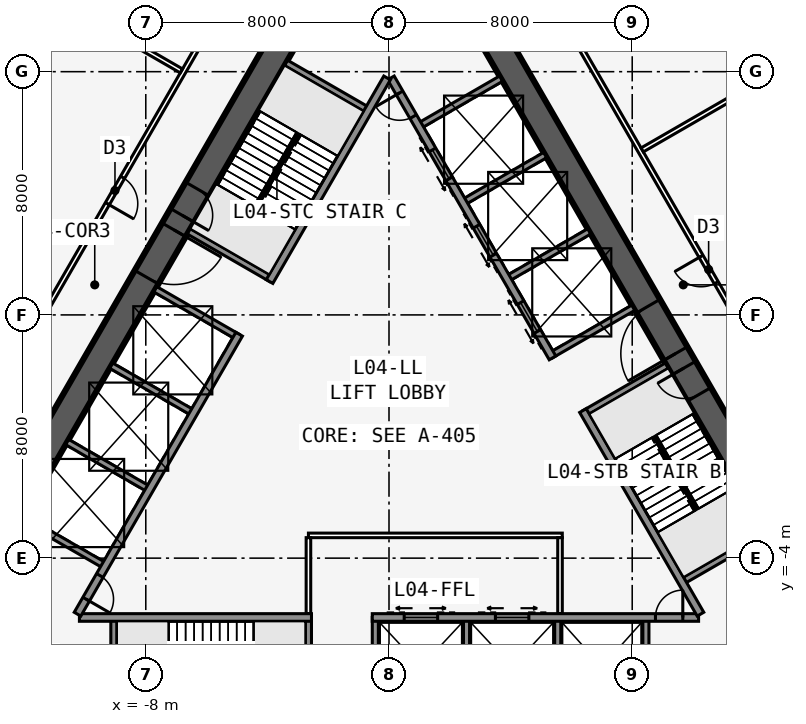
"""IFC4 building model, lengths in metres.
Left out: names, types, materials, properties, quantities, classifications, styles, units other than length and angle.
Written with IfcOpenShell. Run it as: python <this file> out.ifc"""

import sys

from ifc_helpers import new_model, si_unit, direction, frame, frame_2d, origin, place, context, subcontext, project, spatial, rectangle, extrude, element, fill, save


model = new_model("IFC4")
c1 = context("Model", 3, precision=1e-05, world=origin(), true_north=direction((0.0, 1.0)))
c2 = subcontext(c1, "Body", "Model", "MODEL_VIEW")
j1 = project(units=[si_unit("LENGTHUNIT", "METRE"), si_unit("PLANEANGLEUNIT", "RADIAN")], contexts=[c1])
p1 = place(None, origin())
s1 = spatial("IfcSite", under=j1, at=p1, CompositionType="ELEMENT")
p2 = place(p1, origin())
s2 = spatial("IfcBuilding", under=s1, at=p2, CompositionType="ELEMENT")
p3 = place(p2, frame((0.0, 0.0, 22.5)))
s3 = spatial("IfcBuildingStorey", under=s2, at=p3, CompositionType="ELEMENT", Elevation=22.5)
p4 = place(p3, frame((-10.183, -5.951, 0.0), z_axis=(0.0, 0.0, 1.0), x_axis=(1.0, 0.0, 0.0)))
e1 = element("IfcWall", 1, at=p4, inside=s3, PredefinedType="SOLIDWALL", context=c2, shape_type="SweptSolid", body=[
    extrude(rectangle(XDim=7.633, YDim=0.25, at=frame_2d((3.816, 0.0))), origin(), (0.0, 0.0, 1.0), 5.835),
])
p5 = place(p3, frame((-0.55, -5.951, 0.0), z_axis=(0.0, 0.0, 1.0), x_axis=(1.0, 0.0, 0.0)))
e2 = element("IfcWall", 2, at=p5, inside=s3, PredefinedType="SOLIDWALL", context=c2, shape_type="SweptSolid", body=[
    extrude(rectangle(XDim=10.733, YDim=0.25, at=frame_2d((5.366, 0.0))), origin(), (0.0, 0.0, 1.0), 5.835),
])
p6 = place(p5, frame((9.314, 0.0, 0.0)))
e3 = element("IfcOpeningElement", 3, at=p6, cuts=e2, PredefinedType="OPENING", context=c2, shape_type="SweptSolid", body=[
    extrude(rectangle(XDim=0.9, YDim=2.13, at=frame_2d((0.45, 1.065))), frame((0.0, 0.135, 0.0), z_axis=(0.0, -1.0, 0.0), x_axis=(1.0, 0.0, 0.0)), (0.0, 0.0, 1.0), 0.27),
])
p7 = place(p5, frame((1.05, 0.0, 0.0)))
e4 = element("IfcOpeningElement", 4, at=p7, cuts=e2, PredefinedType="OPENING", context=c2, shape_type="SweptSolid", body=[
    extrude(rectangle(XDim=1.1, YDim=2.13, at=frame_2d((0.55, 1.065))), frame((0.0, 0.135, 0.0), z_axis=(0.0, -1.0, 0.0), x_axis=(1.0, 0.0, 0.0)), (0.0, 0.0, 1.0), 0.27),
])
p8 = place(p5, frame((4.05, 0.0, 0.0)))
e5 = element("IfcOpeningElement", 5, at=p8, cuts=e2, PredefinedType="OPENING", context=c2, shape_type="SweptSolid", body=[
    extrude(rectangle(XDim=1.1, YDim=2.13, at=frame_2d((0.55, 1.065))), frame((0.0, 0.135, 0.0), z_axis=(0.0, -1.0, 0.0), x_axis=(1.0, 0.0, 0.0)), (0.0, 0.0, 1.0), 0.27),
])
p9 = place(p3, frame((-9.05, -5.951, 0.0), z_axis=(0.0, 0.0, 1.0), x_axis=(0.0, -1.0, 0.0)))
e6 = element("IfcWall", 6, at=p9, inside=s3, PredefinedType="SOLIDWALL", context=c2, shape_type="SweptSolid", body=[
    extrude(rectangle(XDim=3.125, YDim=0.2, at=frame_2d((1.562, 0.0))), origin(), (0.0, 0.0, 1.0), 5.835),
])
p10 = place(p3, frame((-2.65, -5.951, 0.0), z_axis=(0.0, 0.0, 1.0), x_axis=(0.0, -1.0, 0.0)))
e7 = element("IfcWall", 7, at=p10, inside=s3, PredefinedType="SOLIDWALL", context=c2, shape_type="SweptSolid", body=[
    extrude(rectangle(XDim=3.125, YDim=0.2, at=frame_2d((1.562, 0.0))), origin(), (0.0, 0.0, 1.0), 5.835),
])
p11 = place(p10, frame((1.525, 0.0, 0.0)))
e8 = element("IfcOpeningElement", 8, at=p11, cuts=e7, PredefinedType="OPENING", context=c2, shape_type="SweptSolid", body=[
    extrude(rectangle(XDim=1.0, YDim=2.13, at=frame_2d((0.5, 1.065))), frame((0.0, 0.11, 0.0), z_axis=(0.0, -1.0, 0.0), x_axis=(1.0, 0.0, 0.0)), (0.0, 0.0, 1.0), 0.22),
])
for number, where, z_axis, x_axis in (
    (9, (-0.45, -5.951, 0.0), (0.0, 0.0, 1.0), (0.0, -1.0, 0.0)),
    (10, (2.55, -5.951, 0.0), (0.0, 0.0, 1.0), (0.0, -1.0, 0.0)),
    (11, (5.55, -5.951, 0.0), (0.0, 0.0, 1.0), (0.0, -1.0, 0.0)),
    (12, (8.45, -5.951, 0.0), (0.0, 0.0, 1.0), (0.0, -1.0, 0.0)),
):
    element("IfcWall", number, at=place(p3, frame(where, z_axis=z_axis, x_axis=x_axis)), inside=s3, PredefinedType="SOLIDWALL", context=c2, shape_type="SweptSolid", body=[
        extrude(rectangle(XDim=3.125, YDim=0.2, at=frame_2d((1.562, 0.0))), origin(), (0.0, 0.0, 1.0), 5.835),
    ])
p12 = place(p3, frame((16.5, -9.526, 0.0), z_axis=(0.0, 0.0, 1.0), x_axis=(-0.499999749417, 0.866025548458, 0.0)))
e13 = element("IfcWall", 13, at=p12, inside=s3, PredefinedType="SHEAR", context=c2, shape_type="SweptSolid", body=[
    extrude(rectangle(XDim=33.0, YDim=0.9, at=frame_2d((16.5, 0.0))), origin(), (0.0, 0.0, 1.0), 6.0),
])
p13 = place(p12, frame((14.15, 0.0, 0.0)))
e14 = element("IfcOpeningElement", 14, at=p13, cuts=e13, PredefinedType="OPENING", context=c2, shape_type="SweptSolid", body=[
    extrude(rectangle(XDim=1.8, YDim=2.13, at=frame_2d((0.9, 1.065))), frame((0.0, 0.46, 0.0), z_axis=(0.0, -1.0, 0.0), x_axis=(1.0, 0.0, 0.0)), (0.0, 0.0, 1.0), 0.92),
])
p14 = place(p12, frame((12.6, 0.0, 0.0)))
e15 = element("IfcOpeningElement", 15, at=p14, cuts=e13, PredefinedType="OPENING", context=c2, shape_type="SweptSolid", body=[
    extrude(rectangle(XDim=1.0, YDim=2.13, at=frame_2d((0.5, 1.065))), frame((0.0, 0.46, 0.0), z_axis=(0.0, -1.0, 0.0), x_axis=(1.0, 0.0, 0.0)), (0.0, 0.0, 1.0), 0.92),
])
p15 = place(p3, frame((10.245, -5.843, 0.0), z_axis=(0.0, 0.0, 1.0), x_axis=(-0.499993009313, 0.866029439822, 0.0)))
e16 = element("IfcWall", 16, at=p15, inside=s3, PredefinedType="SOLIDWALL", context=c2, shape_type="SweptSolid", body=[
    extrude(rectangle(XDim=7.733, YDim=0.25, at=frame_2d((3.866, 0.0))), origin(), (0.0, 0.0, 1.0), 5.835),
])
p16 = place(p3, frame((5.379, 2.586, 0.0), z_axis=(0.0, 0.0, 1.0), x_axis=(-0.500001375892, 0.866024609411, 0.0)))
e17 = element("IfcWall", 17, at=p16, inside=s3, PredefinedType="SOLIDWALL", context=c2, shape_type="SweptSolid", body=[
    extrude(rectangle(XDim=10.633, YDim=0.25, at=frame_2d((5.316, 0.0))), origin(), (0.0, 0.0, 1.0), 5.835),
])
p17 = place(p16, frame((9.164, 0.0, 0.0)))
e18 = element("IfcOpeningElement", 18, at=p17, cuts=e17, PredefinedType="OPENING", context=c2, shape_type="SweptSolid", body=[
    extrude(rectangle(XDim=0.9, YDim=2.13, at=frame_2d((0.45, 1.065))), frame((0.0, 0.135, 0.0), z_axis=(0.0, -1.0, 0.0), x_axis=(1.0, 0.0, 0.0)), (0.0, 0.0, 1.0), 0.27),
])
p18 = place(p16, frame((1.0, 0.0, 0.0)))
e19 = element("IfcOpeningElement", 19, at=p18, cuts=e17, PredefinedType="OPENING", context=c2, shape_type="SweptSolid", body=[
    extrude(rectangle(XDim=1.1, YDim=2.13, at=frame_2d((0.55, 1.065))), frame((0.0, 0.135, 0.0), z_axis=(0.0, -1.0, 0.0), x_axis=(1.0, 0.0, 0.0)), (0.0, 0.0, 1.0), 0.27),
])
p19 = place(p16, frame((3.9, 0.0, 0.0)))
e20 = element("IfcOpeningElement", 20, at=p19, cuts=e17, PredefinedType="OPENING", context=c2, shape_type="SweptSolid", body=[
    extrude(rectangle(XDim=1.1, YDim=2.13, at=frame_2d((0.55, 1.065))), frame((0.0, 0.135, 0.0), z_axis=(0.0, -1.0, 0.0), x_axis=(1.0, 0.0, 0.0)), (0.0, 0.0, 1.0), 0.27),
])
p20 = place(p16, frame((6.8, 0.0, 0.0)))
e21 = element("IfcOpeningElement", 21, at=p20, cuts=e17, PredefinedType="OPENING", context=c2, shape_type="SweptSolid", body=[
    extrude(rectangle(XDim=1.1, YDim=2.13, at=frame_2d((0.55, 1.065))), frame((0.0, 0.135, 0.0), z_axis=(0.0, -1.0, 0.0), x_axis=(1.0, 0.0, 0.0)), (0.0, 0.0, 1.0), 0.27),
])
for number, where, z_axis, x_axis in (
    (22, (9.629, -4.775, 0.0), (0.0, 0.0, 1.0), (0.866, 0.5, 0.0)),
    (23, (6.429, 0.767, 0.0), (0.0, 0.0, 1.0), (0.866, 0.5, 0.0)),
    (24, (5.329, 2.673, 0.0), (0.0, 0.0, 1.0), (0.866, 0.5, 0.0)),
    (25, (3.879, 5.184, 0.0), (0.0, 0.0, 1.0), (0.866, 0.5, 0.0)),
    (26, (2.429, 7.696, 0.0), (0.0, 0.0, 1.0), (0.866, 0.5, 0.0)),
    (27, (0.979, 10.207, 0.0), (0.0, 0.0, 1.0), (0.866, 0.5, 0.0)),
):
    element("IfcWall", number, at=place(p3, frame(where, z_axis=z_axis, x_axis=x_axis)), inside=s3, PredefinedType="SOLIDWALL", context=c2, shape_type="SweptSolid", body=[
        extrude(rectangle(XDim=3.125, YDim=0.2, at=frame_2d((1.562, 0.0))), origin(), (0.0, 0.0, 1.0), 5.835),
    ])
p21 = place(p3, frame((0.0, 19.052, 0.0), z_axis=(0.0, 0.0, 1.0), x_axis=(-0.499999749417, -0.866025548458, 0.0)))
e28 = element("IfcWall", 28, at=p21, inside=s3, PredefinedType="SHEAR", context=c2, shape_type="SweptSolid", body=[
    extrude(rectangle(XDim=33.0, YDim=0.9, at=frame_2d((16.5, 0.0))), origin(), (0.0, 0.0, 1.0), 6.0),
])
p22 = place(p21, frame((14.15, 0.0, 0.0)))
e29 = element("IfcOpeningElement", 29, at=p22, cuts=e28, PredefinedType="OPENING", context=c2, shape_type="SweptSolid", body=[
    extrude(rectangle(XDim=1.8, YDim=2.13, at=frame_2d((0.9, 1.065))), frame((0.0, 0.46, 0.0), z_axis=(0.0, -1.0, 0.0), x_axis=(1.0, 0.0, 0.0)), (0.0, 0.0, 1.0), 0.92),
])
p23 = place(p21, frame((12.6, 0.0, 0.0)))
e30 = element("IfcOpeningElement", 30, at=p23, cuts=e28, PredefinedType="OPENING", context=c2, shape_type="SweptSolid", body=[
    extrude(rectangle(XDim=1.0, YDim=2.13, at=frame_2d((0.5, 1.065))), frame((0.0, 0.46, 0.0), z_axis=(0.0, -1.0, 0.0), x_axis=(1.0, 0.0, 0.0)), (0.0, 0.0, 1.0), 0.92),
])
p24 = place(p3, frame((-0.062, 11.794, 0.0), z_axis=(0.0, 0.0, 1.0), x_axis=(-0.500006680225, -0.86602154692, 0.0)))
e31 = element("IfcWall", 31, at=p24, inside=s3, PredefinedType="SOLIDWALL", context=c2, shape_type="SweptSolid", body=[
    extrude(rectangle(XDim=7.733, YDim=0.25, at=frame_2d((3.866, 0.0))), origin(), (0.0, 0.0, 1.0), 5.835),
])
p25 = place(p3, frame((-4.929, 3.365, 0.0), z_axis=(0.0, 0.0, 1.0), x_axis=(-0.499991433582, -0.866030349552, 0.0)))
e32 = element("IfcWall", 32, at=p25, inside=s3, PredefinedType="SOLIDWALL", context=c2, shape_type="SweptSolid", body=[
    extrude(rectangle(XDim=10.633, YDim=0.25, at=frame_2d((5.316, 0.0))), origin(), (0.0, 0.0, 1.0), 5.835),
])
p26 = place(p25, frame((9.164, 0.0, 0.0)))
e33 = element("IfcOpeningElement", 33, at=p26, cuts=e32, PredefinedType="OPENING", context=c2, shape_type="SweptSolid", body=[
    extrude(rectangle(XDim=0.9, YDim=2.13, at=frame_2d((0.45, 1.065))), frame((0.0, 0.135, 0.0), z_axis=(0.0, -1.0, 0.0), x_axis=(1.0, 0.0, 0.0)), (0.0, 0.0, 1.0), 0.27),
])
for number, where, z_axis, x_axis in (
    (34, (-0.679, 10.727, 0.0), (0.0, 0.0, 1.0), (-0.866, 0.5, 0.0)),
    (35, (-3.879, 5.184, 0.0), (0.0, 0.0, 1.0), (-0.866, 0.5, 0.0)),
    (36, (-4.979, 3.279, 0.0), (0.0, 0.0, 1.0), (-0.866, 0.5, 0.0)),
    (37, (-6.429, 0.767, 0.0), (0.0, 0.0, 1.0), (-0.866, 0.5, 0.0)),
    (38, (-7.879, -1.744, 0.0), (0.0, 0.0, 1.0), (-0.866, 0.5, 0.0)),
    (39, (-9.329, -4.256, 0.0), (0.0, 0.0, 1.0), (-0.866, 0.5, 0.0)),
):
    element("IfcWall", number, at=place(p3, frame(where, z_axis=z_axis, x_axis=x_axis)), inside=s3, PredefinedType="SOLIDWALL", context=c2, shape_type="SweptSolid", body=[
        extrude(rectangle(XDim=3.125, YDim=0.2, at=frame_2d((1.562, 0.0))), origin(), (0.0, 0.0, 1.0), 5.835),
    ])
p27 = place(p3, frame((20.027, -10.985, 0.0), z_axis=(0.0, 0.0, 1.0), x_axis=(-0.500001677587, 0.866024435227, 0.0)))
e40 = element("IfcWall", 40, at=p27, inside=s3, PredefinedType="PARTITIONING", context=c2, shape_type="SweptSolid", body=[
    extrude(rectangle(XDim=39.054, YDim=0.15, at=frame_2d((19.527, 0.0))), origin(), (0.0, 0.0, 1.0), 5.835),
])
p28 = place(p27, frame((6.914, 0.0, 0.0)))
e41 = element("IfcOpeningElement", 41, at=p28, cuts=e40, PredefinedType="OPENING", context=c2, shape_type="SweptSolid", body=[
    extrude(rectangle(XDim=1.0, YDim=2.13, at=frame_2d((0.5, 1.065))), frame((0.0, 0.085, 0.0), z_axis=(0.0, -1.0, 0.0), x_axis=(1.0, 0.0, 0.0)), (0.0, 0.0, 1.0), 0.17),
])
p29 = place(p27, frame((18.527, 0.0, 0.0)))
e42 = element("IfcOpeningElement", 42, at=p29, cuts=e40, PredefinedType="OPENING", context=c2, shape_type="SweptSolid", body=[
    extrude(rectangle(XDim=1.0, YDim=2.13, at=frame_2d((0.5, 1.065))), frame((0.0, 0.085, 0.0), z_axis=(0.0, -1.0, 0.0), x_axis=(1.0, 0.0, 0.0)), (0.0, 0.0, 1.0), 0.17),
])
p30 = place(p27, frame((30.64, 0.0, 0.0)))
e43 = element("IfcOpeningElement", 43, at=p30, cuts=e40, PredefinedType="OPENING", context=c2, shape_type="SweptSolid", body=[
    extrude(rectangle(XDim=1.0, YDim=2.13, at=frame_2d((0.5, 1.065))), frame((0.0, 0.085, 0.0), z_axis=(0.0, -1.0, 0.0), x_axis=(1.0, 0.0, 0.0)), (0.0, 0.0, 1.0), 0.17),
])
p31 = place(p3, frame((8.329, 9.427, 0.0), z_axis=(0.0, 0.0, 1.0), x_axis=(0.866027840197, 0.499995779986, 0.0)))
e44 = element("IfcWall", 44, at=p31, inside=s3, PredefinedType="PARTITIONING", context=c2, shape_type="SweptSolid", body=[
    extrude(rectangle(XDim=9.974, YDim=0.15, at=frame_2d((4.987, 0.0))), origin(), (0.0, 0.0, 1.0), 5.835),
])
p32 = place(p3, frame((-0.5, 22.836, 0.0), z_axis=(0.0, 0.0, 1.0), x_axis=(-0.500001677587, -0.866024435227, 0.0)))
e45 = element("IfcWall", 45, at=p32, inside=s3, PredefinedType="PARTITIONING", context=c2, shape_type="SweptSolid", body=[
    extrude(rectangle(XDim=39.054, YDim=0.15, at=frame_2d((19.527, 0.0))), origin(), (0.0, 0.0, 1.0), 5.835),
])
p33 = place(p32, frame((5.914, 0.0, 0.0)))
e46 = element("IfcOpeningElement", 46, at=p33, cuts=e45, PredefinedType="OPENING", context=c2, shape_type="SweptSolid", body=[
    extrude(rectangle(XDim=1.0, YDim=2.13, at=frame_2d((0.5, 1.065))), frame((0.0, 0.085, 0.0), z_axis=(0.0, -1.0, 0.0), x_axis=(1.0, 0.0, 0.0)), (0.0, 0.0, 1.0), 0.17),
])
p34 = place(p32, frame((16.527, 0.0, 0.0)))
e47 = element("IfcOpeningElement", 47, at=p34, cuts=e45, PredefinedType="OPENING", context=c2, shape_type="SweptSolid", body=[
    extrude(rectangle(XDim=1.0, YDim=2.13, at=frame_2d((0.5, 1.065))), frame((0.0, 0.085, 0.0), z_axis=(0.0, -1.0, 0.0), x_axis=(1.0, 0.0, 0.0)), (0.0, 0.0, 1.0), 0.17),
])
p35 = place(p32, frame((29.64, 0.0, 0.0)))
e48 = element("IfcOpeningElement", 48, at=p35, cuts=e45, PredefinedType="OPENING", context=c2, shape_type="SweptSolid", body=[
    extrude(rectangle(XDim=1.0, YDim=2.13, at=frame_2d((0.5, 1.065))), frame((0.0, 0.085, 0.0), z_axis=(0.0, -1.0, 0.0), x_axis=(1.0, 0.0, 0.0)), (0.0, 0.0, 1.0), 0.17),
])
p36 = place(p3, frame((-6.829, 12.025, 0.0), z_axis=(0.0, 0.0, 1.0), x_axis=(-0.866025631456, 0.499999605661, 0.0)))
e49 = element("IfcWall", 49, at=p36, inside=s3, PredefinedType="PARTITIONING", context=c2, shape_type="SweptSolid", body=[
    extrude(rectangle(XDim=9.76, YDim=0.15, at=frame_2d((4.88, 0.0))), origin(), (0.0, 0.0, 1.0), 5.835),
])
p37 = place(p3, frame((-2.65, -3.251, 0.0), z_axis=(0.0, 0.0, 1.0), x_axis=(1.0, 0.0, 0.0)))
e50 = element("IfcWall", 50, at=p37, inside=s3, PredefinedType="PARTITIONING", context=c2, shape_type="SweptSolid", body=[
    extrude(rectangle(XDim=8.35, YDim=0.15, at=frame_2d((4.175, 0.0))), origin(), (0.0, 0.0, 1.0), 5.835),
])
for number, where, z_axis, x_axis in (
    (51, (-2.65, -5.826, 0.0), (0.0, 0.0, 1.0), (0.0, 1.0, 0.0)),
    (52, (5.625, -5.826, 0.0), (0.0, 0.0, 1.0), (0.0, 1.0, 0.0)),
):
    element("IfcWall", number, at=place(p3, frame(where, z_axis=z_axis, x_axis=x_axis)), inside=s3, PredefinedType="PARTITIONING", context=c2, shape_type="SweptSolid", body=[
        extrude(rectangle(XDim=2.5, YDim=0.15, at=frame_2d((1.25, 0.0))), origin(), (0.0, 0.0, 1.0), 5.835),
    ])
for number, where, z_axis, x_axis in (
    (53, (10.135, -2.401, 0.0), (0.0, 0.0, 1.0), (-0.5, 0.866, 0.0)),
    (54, (-2.988, 9.978, 0.0), (0.0, 0.0, 1.0), (-0.5, -0.866, 0.0)),
):
    element("IfcWall", number, at=place(p3, frame(where, z_axis=z_axis, x_axis=x_axis)), inside=s3, PredefinedType="SOLIDWALL", context=c2, shape_type="SweptSolid", body=[
        extrude(rectangle(XDim=2.794, YDim=0.1, at=frame_2d((1.397, 0.0))), origin(), (0.0, 0.0, 1.0), 6.0),
    ])
p38 = place(p29, origin())
e55 = element("IfcDoor", 55, at=p38, inside=s3, OperationType="SINGLE_SWING_RIGHT", PredefinedType="DOOR", context=c2, shape_type="SweptSolid", body=[
    extrude(rectangle(XDim=1.0, YDim=2.13, at=frame_2d((0.5, 1.065))), frame((0.0, 0.025, 0.0), z_axis=(0.0, -1.0, 0.0), x_axis=(1.0, 0.0, 0.0)), (0.0, 0.0, 1.0), 0.05),
])
fill(e42, e55)
p39 = place(p34, origin())
e56 = element("IfcDoor", 56, at=p39, inside=s3, OperationType="SINGLE_SWING_RIGHT", PredefinedType="DOOR", context=c2, shape_type="SweptSolid", body=[
    extrude(rectangle(XDim=1.0, YDim=2.13, at=frame_2d((0.5, 1.065))), frame((0.0, 0.025, 0.0), z_axis=(0.0, -1.0, 0.0), x_axis=(1.0, 0.0, 0.0)), (0.0, 0.0, 1.0), 0.05),
])
fill(e47, e56)
p40 = place(p13, origin())
e57 = element("IfcDoor", 57, at=p40, inside=s3, OperationType="DOUBLE_DOOR_SINGLE_SWING", PredefinedType="DOOR", context=c2, shape_type="SweptSolid", body=[
    extrude(rectangle(XDim=1.8, YDim=2.13, at=frame_2d((0.9, 1.065))), frame((0.0, 0.025, 0.0), z_axis=(0.0, -1.0, 0.0), x_axis=(1.0, 0.0, 0.0)), (0.0, 0.0, 1.0), 0.05),
])
fill(e14, e57)
p41 = place(p14, origin())
e58 = element("IfcDoor", 58, at=p41, inside=s3, OperationType="SINGLE_SWING_RIGHT", PredefinedType="DOOR", context=c2, shape_type="SweptSolid", body=[
    extrude(rectangle(XDim=1.0, YDim=2.13, at=frame_2d((0.5, 1.065))), frame((0.0, 0.025, 0.0), z_axis=(0.0, -1.0, 0.0), x_axis=(1.0, 0.0, 0.0)), (0.0, 0.0, 1.0), 0.05),
])
fill(e15, e58)
p42 = place(p22, origin())
e59 = element("IfcDoor", 59, at=p42, inside=s3, OperationType="DOUBLE_DOOR_SINGLE_SWING", PredefinedType="DOOR", context=c2, shape_type="SweptSolid", body=[
    extrude(rectangle(XDim=1.8, YDim=2.13, at=frame_2d((0.9, 1.065))), frame((0.0, 0.025, 0.0), z_axis=(0.0, -1.0, 0.0), x_axis=(1.0, 0.0, 0.0)), (0.0, 0.0, 1.0), 0.05),
])
fill(e29, e59)
p43 = place(p23, origin())
e60 = element("IfcDoor", 60, at=p43, inside=s3, OperationType="SINGLE_SWING_RIGHT", PredefinedType="DOOR", context=c2, shape_type="SweptSolid", body=[
    extrude(rectangle(XDim=1.0, YDim=2.13, at=frame_2d((0.5, 1.065))), frame((0.0, 0.025, 0.0), z_axis=(0.0, -1.0, 0.0), x_axis=(1.0, 0.0, 0.0)), (0.0, 0.0, 1.0), 0.05),
])
fill(e30, e60)
p44 = place(p6, origin())
e61 = element("IfcDoor", 61, at=p44, inside=s3, OperationType="SINGLE_SWING_RIGHT", PredefinedType="DOOR", context=c2, shape_type="SweptSolid", body=[
    extrude(rectangle(XDim=0.9, YDim=2.13, at=frame_2d((0.45, 1.065))), frame((0.0, 0.025, 0.0), z_axis=(0.0, -1.0, 0.0), x_axis=(1.0, 0.0, 0.0)), (0.0, 0.0, 1.0), 0.05),
])
fill(e3, e61)
p45 = place(p17, origin())
e62 = element("IfcDoor", 62, at=p45, inside=s3, OperationType="SINGLE_SWING_RIGHT", PredefinedType="DOOR", context=c2, shape_type="SweptSolid", body=[
    extrude(rectangle(XDim=0.9, YDim=2.13, at=frame_2d((0.45, 1.065))), frame((0.0, 0.025, 0.0), z_axis=(0.0, -1.0, 0.0), x_axis=(1.0, 0.0, 0.0)), (0.0, 0.0, 1.0), 0.05),
])
fill(e18, e62)
p46 = place(p26, origin())
e63 = element("IfcDoor", 63, at=p46, inside=s3, OperationType="SINGLE_SWING_RIGHT", PredefinedType="DOOR", context=c2, shape_type="SweptSolid", body=[
    extrude(rectangle(XDim=0.9, YDim=2.13, at=frame_2d((0.45, 1.065))), frame((0.0, 0.025, 0.0), z_axis=(0.0, -1.0, 0.0), x_axis=(1.0, 0.0, 0.0)), (0.0, 0.0, 1.0), 0.05),
])
fill(e33, e63)
p47 = place(p7, origin())
e64 = element("IfcDoor", 64, at=p47, inside=s3, OperationType="DOUBLE_DOOR_SLIDING", PredefinedType="USERDEFINED", context=c2, shape_type="SweptSolid", body=[
    extrude(rectangle(XDim=1.1, YDim=2.13, at=frame_2d((0.55, 1.065))), frame((0.0, 0.025, 0.0), z_axis=(0.0, -1.0, 0.0), x_axis=(1.0, 0.0, 0.0)), (0.0, 0.0, 1.0), 0.05),
])
fill(e4, e64)
p48 = place(p8, origin())
e65 = element("IfcDoor", 65, at=p48, inside=s3, OperationType="DOUBLE_DOOR_SLIDING", PredefinedType="USERDEFINED", context=c2, shape_type="SweptSolid", body=[
    extrude(rectangle(XDim=1.1, YDim=2.13, at=frame_2d((0.55, 1.065))), frame((0.0, 0.025, 0.0), z_axis=(0.0, -1.0, 0.0), x_axis=(1.0, 0.0, 0.0)), (0.0, 0.0, 1.0), 0.05),
])
fill(e5, e65)
p49 = place(p18, origin())
e66 = element("IfcDoor", 66, at=p49, inside=s3, OperationType="DOUBLE_DOOR_SLIDING", PredefinedType="USERDEFINED", context=c2, shape_type="SweptSolid", body=[
    extrude(rectangle(XDim=1.1, YDim=2.13, at=frame_2d((0.55, 1.065))), frame((0.0, 0.025, 0.0), z_axis=(0.0, -1.0, 0.0), x_axis=(1.0, 0.0, 0.0)), (0.0, 0.0, 1.0), 0.05),
])
fill(e19, e66)
p50 = place(p19, origin())
e67 = element("IfcDoor", 67, at=p50, inside=s3, OperationType="DOUBLE_DOOR_SLIDING", PredefinedType="USERDEFINED", context=c2, shape_type="SweptSolid", body=[
    extrude(rectangle(XDim=1.1, YDim=2.13, at=frame_2d((0.55, 1.065))), frame((0.0, 0.025, 0.0), z_axis=(0.0, -1.0, 0.0), x_axis=(1.0, 0.0, 0.0)), (0.0, 0.0, 1.0), 0.05),
])
fill(e20, e67)
p51 = place(p20, origin())
e68 = element("IfcDoor", 68, at=p51, inside=s3, OperationType="DOUBLE_DOOR_SLIDING", PredefinedType="USERDEFINED", context=c2, shape_type="SweptSolid", body=[
    extrude(rectangle(XDim=1.1, YDim=2.13, at=frame_2d((0.55, 1.065))), frame((0.0, 0.025, 0.0), z_axis=(0.0, -1.0, 0.0), x_axis=(1.0, 0.0, 0.0)), (0.0, 0.0, 1.0), 0.05),
])
fill(e21, e68)
save(model, sys.argv[1])
